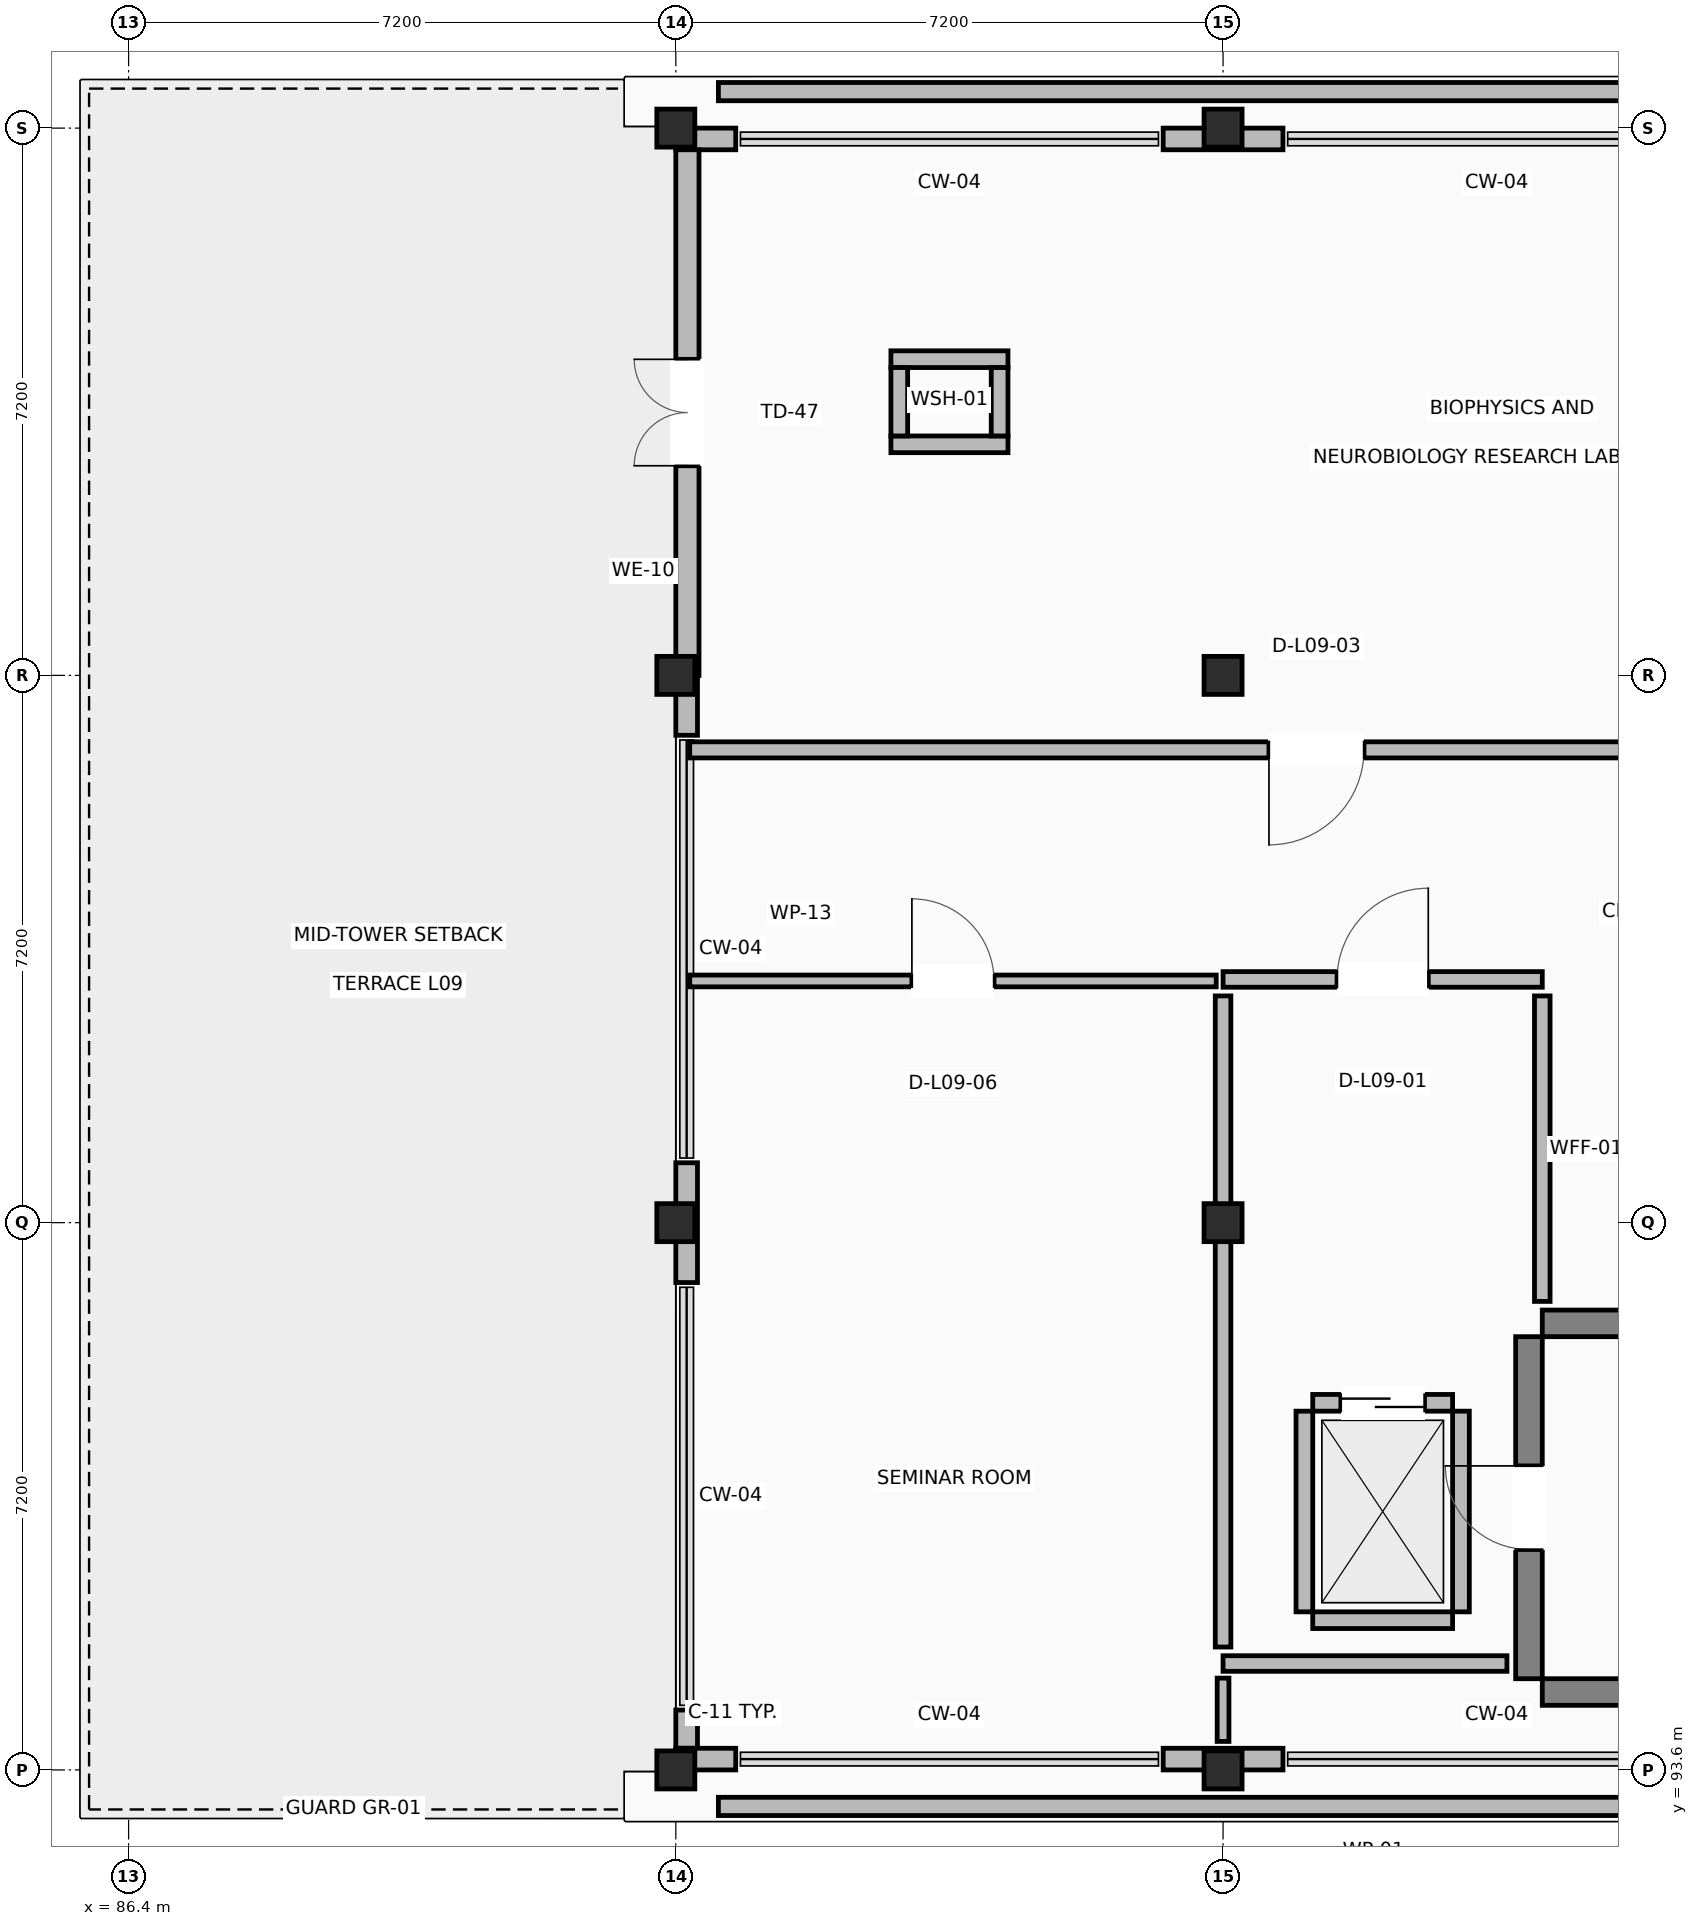
"""IFC4 building model, lengths in metres.
Left out: names, types, materials, properties, quantities, classifications, styles, units other than length and angle.
Written with IfcOpenShell. Run it as: python <this file> out.ifc"""

import sys

from ifc_helpers import new_model, si_unit, direction, frame, frame_2d, origin, origin_2d, place, context, subcontext, project, spatial, rectangle, extrude, element, fill, save


model = new_model("IFC4")
c1 = context("Model", 3, precision=1e-05, world=origin(), true_north=direction((0.0, 1.0)))
c2 = subcontext(c1, "Body", "Model", "MODEL_VIEW")
j1 = project(units=[si_unit("LENGTHUNIT", "METRE"), si_unit("PLANEANGLEUNIT", "RADIAN")], contexts=[c1])
p1 = place(None, origin())
s1 = spatial("IfcSite", under=j1, at=p1, CompositionType="ELEMENT")
p2 = place(p1, origin())
s2 = spatial("IfcBuilding", under=s1, at=p2, CompositionType="ELEMENT")
p3 = place(p2, frame((0.0, 0.0, 39.6)))
s3 = spatial("IfcBuildingStorey", under=s2, at=p3, CompositionType="ELEMENT", Elevation=39.6)
for number, where, z_axis, x_axis in (
    (1, (93.6, 93.6, 0.0), (0.0, 0.0, 1.0), (1.0, 0.0, 0.0)),
    (2, (93.6, 100.8, 0.0), (0.0, 0.0, 1.0), (1.0, 0.0, 0.0)),
    (3, (93.6, 108.0, 0.0), (0.0, 0.0, 1.0), (1.0, 0.0, 0.0)),
    (4, (93.6, 115.2, 0.0), (0.0, 0.0, 1.0), (1.0, 0.0, 0.0)),
    (5, (100.8, 93.6, 0.0), (0.0, 0.0, 1.0), (1.0, 0.0, 0.0)),
    (6, (100.8, 100.8, 0.0), (0.0, 0.0, 1.0), (1.0, 0.0, 0.0)),
    (7, (100.8, 108.0, 0.0), (0.0, 0.0, 1.0), (1.0, 0.0, 0.0)),
    (8, (100.8, 115.2, 0.0), (0.0, 0.0, 1.0), (1.0, 0.0, 0.0)),
):
    element("IfcColumn", number, at=place(p3, frame(where, z_axis=z_axis, x_axis=x_axis)), inside=s3, PredefinedType="COLUMN", context=c2, shape_type="SweptSolid", body=[
        extrude(rectangle(XDim=0.5, YDim=0.5, at=origin_2d()), origin(), (0.0, 0.0, 1.0), 3.92),
    ])
for number, where, z_axis, x_axis in (
    (9, (105.0, 94.625, 0.0), (0.0, 0.0, 1.0), (1.0, 0.0, 0.0)),
    (10, (105.0, 99.475, 0.0), (0.0, 0.0, 1.0), (1.0, 0.0, 0.0)),
):
    element("IfcWall", number, at=place(p3, frame(where, z_axis=z_axis, x_axis=x_axis)), inside=s3, PredefinedType="SHEAR", context=c2, shape_type="SweptSolid", body=[
        extrude(rectangle(XDim=9.5, YDim=0.35, at=frame_2d((4.75, 0.0))), origin(), (0.0, 0.0, 1.0), 3.92),
    ])
p4 = place(p3, frame((104.825, 94.8, 0.0), z_axis=(0.0, 0.0, 1.0), x_axis=(0.0, 1.0, 0.0)))
e11 = element("IfcWall", 11, at=p4, inside=s3, PredefinedType="SHEAR", context=c2, shape_type="SweptSolid", body=[
    extrude(rectangle(XDim=4.5, YDim=0.35, at=frame_2d((2.25, 0.0))), origin(), (0.0, 0.0, 1.0), 3.92),
])
p5 = place(p4, frame((1.7, 0.0, 0.0)))
e12 = element("IfcOpeningElement", 12, at=p5, cuts=e11, PredefinedType="OPENING", context=c2, shape_type="SweptSolid", body=[
    extrude(rectangle(XDim=1.1, YDim=2.15, at=frame_2d((0.55, 1.075))), frame((0.0, 0.185, 0.0), z_axis=(0.0, -1.0, 0.0), x_axis=(1.0, 0.0, 0.0)), (0.0, 0.0, 1.0), 0.37),
])
p6 = place(p3, frame((101.588, 115.058, 0.0), z_axis=(0.0, 0.0, 1.0), x_axis=(-1.0, 0.0, 0.0)))
e13 = element("IfcWall", 13, at=p6, inside=s3, PredefinedType="STANDARD", context=c2, shape_type="SweptSolid", body=[
    extrude(rectangle(XDim=1.576, YDim=0.285, at=frame_2d((0.788, 0.0))), origin(), (0.0, 0.0, 1.0), 2.96),
])
p7 = place(p3, frame((94.388, 115.058, 0.0), z_axis=(0.0, 0.0, 1.0), x_axis=(-1.0, 0.0, 0.0)))
e14 = element("IfcWall", 14, at=p7, inside=s3, PredefinedType="STANDARD", context=c2, shape_type="SweptSolid", body=[
    extrude(rectangle(XDim=0.788, YDim=0.285, at=frame_2d((0.394, 0.0))), origin(), (0.0, 0.0, 1.0), 2.96),
])
p8 = place(p3, frame((93.752, 108.0, 0.0), z_axis=(0.0, 0.0, 1.0), x_axis=(0.0, 1.0, 0.0)))
e15 = element("IfcWall", 15, at=p8, inside=s3, PredefinedType="STANDARD", context=c2, shape_type="SweptSolid", body=[
    extrude(rectangle(XDim=6.915, YDim=0.305, at=frame_2d((3.458, 0.0))), origin(), (0.0, 0.0, 1.0), 2.96),
])
p9 = place(p8, frame((2.758, 0.0, 0.0)))
e16 = element("IfcOpeningElement", 16, at=p9, cuts=e15, PredefinedType="OPENING", context=c2, shape_type="SweptSolid", body=[
    extrude(rectangle(XDim=1.4, YDim=2.15, at=frame_2d((0.7, 1.075))), frame((0.0, 0.162, 0.0), z_axis=(0.0, -1.0, 0.0), x_axis=(1.0, 0.0, 0.0)), (0.0, 0.0, 1.0), 0.325),
])
p10 = place(p3, frame((93.742, 108.0, 0.0), z_axis=(0.0, 0.0, 1.0), x_axis=(0.0, -1.0, 0.0)))
e17 = element("IfcWall", 17, at=p10, inside=s3, PredefinedType="STANDARD", context=c2, shape_type="SweptSolid", body=[
    extrude(rectangle(XDim=0.788, YDim=0.285, at=frame_2d((0.394, 0.0))), origin(), (0.0, 0.0, 1.0), 2.96),
])
p11 = place(p3, frame((93.742, 101.588, 0.0), z_axis=(0.0, 0.0, 1.0), x_axis=(0.0, -1.0, 0.0)))
e18 = element("IfcWall", 18, at=p11, inside=s3, PredefinedType="STANDARD", context=c2, shape_type="SweptSolid", body=[
    extrude(rectangle(XDim=1.576, YDim=0.285, at=frame_2d((0.788, 0.0))), origin(), (0.0, 0.0, 1.0), 2.96),
])
p12 = place(p3, frame((93.742, 94.388, 0.0), z_axis=(0.0, 0.0, 1.0), x_axis=(0.0, -1.0, 0.0)))
e19 = element("IfcWall", 19, at=p12, inside=s3, PredefinedType="STANDARD", context=c2, shape_type="SweptSolid", body=[
    extrude(rectangle(XDim=0.503, YDim=0.285, at=frame_2d((0.251, 0.0))), origin(), (0.0, 0.0, 1.0), 2.96),
])
p13 = place(p3, frame((93.6, 93.742, 0.0), z_axis=(0.0, 0.0, 1.0), x_axis=(1.0, 0.0, 0.0)))
e20 = element("IfcWall", 20, at=p13, inside=s3, PredefinedType="STANDARD", context=c2, shape_type="SweptSolid", body=[
    extrude(rectangle(XDim=0.788, YDim=0.285, at=frame_2d((0.394, 0.0))), origin(), (0.0, 0.0, 1.0), 2.96),
])
p14 = place(p3, frame((100.012, 93.742, 0.0), z_axis=(0.0, 0.0, 1.0), x_axis=(1.0, 0.0, 0.0)))
e21 = element("IfcWall", 21, at=p14, inside=s3, PredefinedType="STANDARD", context=c2, shape_type="SweptSolid", body=[
    extrude(rectangle(XDim=1.576, YDim=0.285, at=frame_2d((0.788, 0.0))), origin(), (0.0, 0.0, 1.0), 2.96),
])
p15 = place(p3, frame((136.44, 93.12, 0.0), z_axis=(0.0, 0.0, 1.0), x_axis=(-1.0, 0.0, 0.0)))
e22 = element("IfcWall", 22, at=p15, inside=s3, PredefinedType="PARAPET", context=c2, shape_type="SweptSolid", body=[
    extrude(rectangle(XDim=42.28, YDim=0.24, at=frame_2d((21.14, 0.0))), origin(), (0.0, 0.0, 1.0), 1.12),
])
p16 = place(p3, frame((94.16, 115.68, 0.0), z_axis=(0.0, 0.0, 1.0), x_axis=(1.0, 0.0, 0.0)))
e23 = element("IfcWall", 23, at=p16, inside=s3, PredefinedType="PARAPET", context=c2, shape_type="SweptSolid", body=[
    extrude(rectangle(XDim=57.64, YDim=0.24, at=frame_2d((28.82, 0.0))), origin(), (0.0, 0.0, 1.0), 1.12),
])
p17 = place(p3, frame((101.98, 95.57, 0.0), z_axis=(0.0, 0.0, 1.0), x_axis=(1.0, 0.0, 0.0)))
e24 = element("IfcWall", 24, at=p17, inside=s3, PredefinedType="STANDARD", context=c2, shape_type="SweptSolid", body=[
    extrude(rectangle(XDim=1.84, YDim=0.22, at=frame_2d((0.92, 0.0))), origin(), (0.0, 0.0, 1.0), 2.96),
])
p18 = place(p3, frame((101.98, 98.43, 0.0), z_axis=(0.0, 0.0, 1.0), x_axis=(1.0, 0.0, 0.0)))
e25 = element("IfcWall", 25, at=p18, inside=s3, PredefinedType="STANDARD", context=c2, shape_type="SweptSolid", body=[
    extrude(rectangle(XDim=1.84, YDim=0.22, at=frame_2d((0.92, 0.0))), origin(), (0.0, 0.0, 1.0), 2.96),
])
p19 = place(p18, frame((0.37, 0.0, 0.0)))
e26 = element("IfcOpeningElement", 26, at=p19, cuts=e25, PredefinedType="OPENING", context=c2, shape_type="SweptSolid", body=[
    extrude(rectangle(XDim=1.1, YDim=2.15, at=frame_2d((0.55, 1.075))), frame((0.0, 0.12, 0.0), z_axis=(0.0, -1.0, 0.0), x_axis=(1.0, 0.0, 0.0)), (0.0, 0.0, 1.0), 0.24),
])
for number, where, z_axis, x_axis in (
    (27, (101.87, 95.68, 0.0), (0.0, 0.0, 1.0), (0.0, 1.0, 0.0)),
    (28, (103.93, 95.68, 0.0), (0.0, 0.0, 1.0), (0.0, 1.0, 0.0)),
):
    element("IfcWall", number, at=place(p3, frame(where, z_axis=z_axis, x_axis=x_axis)), inside=s3, PredefinedType="STANDARD", context=c2, shape_type="SweptSolid", body=[
        extrude(rectangle(XDim=2.64, YDim=0.22, at=frame_2d((1.32, 0.0))), origin(), (0.0, 0.0, 1.0), 2.96),
    ])
for number, where, z_axis, x_axis in (
    (29, (96.43, 111.04, 0.0), (0.0, 0.0, 1.0), (1.0, 0.0, 0.0)),
    (30, (96.43, 112.16, 0.0), (0.0, 0.0, 1.0), (1.0, 0.0, 0.0)),
):
    element("IfcWall", number, at=place(p3, frame(where, z_axis=z_axis, x_axis=x_axis)), inside=s3, PredefinedType="STANDARD", context=c2, shape_type="SweptSolid", body=[
        extrude(rectangle(XDim=1.54, YDim=0.22, at=frame_2d((0.77, 0.0))), origin(), (0.0, 0.0, 1.0), 2.96),
    ])
for number, where, z_axis, x_axis in (
    (31, (96.54, 111.15, 0.0), (0.0, 0.0, 1.0), (0.0, 1.0, 0.0)),
    (32, (97.86, 111.15, 0.0), (0.0, 0.0, 1.0), (0.0, 1.0, 0.0)),
):
    element("IfcWall", number, at=place(p3, frame(where, z_axis=z_axis, x_axis=x_axis)), inside=s3, PredefinedType="STANDARD", context=c2, shape_type="SweptSolid", body=[
        extrude(rectangle(XDim=0.9, YDim=0.22, at=frame_2d((0.45, 0.0))), origin(), (0.0, 0.0, 1.0), 2.96),
    ])
p20 = place(p3, frame((100.8, 104.0, 0.0), z_axis=(0.0, 0.0, 1.0), x_axis=(1.0, 0.0, 0.0)))
e33 = element("IfcWall", 33, at=p20, inside=s3, PredefinedType="PARTITIONING", context=c2, shape_type="SweptSolid", body=[
    extrude(rectangle(XDim=4.2, YDim=0.205, at=frame_2d((2.1, 0.0))), origin(), (0.0, 0.0, 1.0), 2.96),
])
p21 = place(p20, frame((1.5, 0.0, 0.0)))
e34 = element("IfcOpeningElement", 34, at=p21, cuts=e33, PredefinedType="OPENING", context=c2, shape_type="SweptSolid", body=[
    extrude(rectangle(XDim=1.2, YDim=2.15, at=frame_2d((0.6, 1.075))), frame((0.0, 0.113, 0.0), z_axis=(0.0, -1.0, 0.0), x_axis=(1.0, 0.0, 0.0)), (0.0, 0.0, 1.0), 0.225),
])
p22 = place(p3, frame((105.0, 103.783, 0.0), z_axis=(0.0, 0.0, 1.0), x_axis=(0.0, -1.0, 0.0)))
e35 = element("IfcWall", 35, at=p22, inside=s3, PredefinedType="PARTITIONING", context=c2, shape_type="SweptSolid", body=[
    extrude(rectangle(XDim=4.019, YDim=0.205, at=frame_2d((2.01, 0.0))), origin(), (0.0, 0.0, 1.0), 2.96),
])
p23 = place(p3, frame((104.535, 95.0, 0.0), z_axis=(0.0, 0.0, 1.0), x_axis=(-1.0, 0.0, 0.0)))
e36 = element("IfcWall", 36, at=p23, inside=s3, PredefinedType="PARTITIONING", context=c2, shape_type="SweptSolid", body=[
    extrude(rectangle(XDim=3.735, YDim=0.205, at=frame_2d((1.867, 0.0))), origin(), (0.0, 0.0, 1.0), 2.96),
])
p24 = place(p3, frame((100.8, 95.217, 0.0), z_axis=(0.0, 0.0, 1.0), x_axis=(0.0, 1.0, 0.0)))
e37 = element("IfcWall", 37, at=p24, inside=s3, PredefinedType="PARTITIONING", context=c2, shape_type="SweptSolid", body=[
    extrude(rectangle(XDim=8.566, YDim=0.205, at=frame_2d((4.283, 0.0))), origin(), (0.0, 0.0, 1.0), 2.96),
])
p25 = place(p3, frame((109.376, 107.02, 0.0), z_axis=(0.0, 0.0, 1.0), x_axis=(-1.0, 0.0, 0.0)))
e38 = element("IfcWall", 38, at=p25, inside=s3, PredefinedType="PARTITIONING", context=c2, shape_type="SweptSolid", body=[
    extrude(rectangle(XDim=15.593, YDim=0.212, at=frame_2d((7.796, 0.0))), origin(), (0.0, 0.0, 1.0), 2.96),
])
p26 = place(p25, frame((6.722, 0.0, 0.0)))
e39 = element("IfcOpeningElement", 39, at=p26, cuts=e38, PredefinedType="OPENING", context=c2, shape_type="SweptSolid", body=[
    extrude(rectangle(XDim=1.25, YDim=2.15, at=frame_2d((0.625, 1.075))), frame((0.0, 0.116, 0.0), z_axis=(0.0, -1.0, 0.0), x_axis=(1.0, 0.0, 0.0)), (0.0, 0.0, 1.0), 0.232),
])
p27 = place(p3, frame((93.783, 103.98, 0.0), z_axis=(0.0, 0.0, 1.0), x_axis=(1.0, 0.0, 0.0)))
e40 = element("IfcWall", 40, at=p27, inside=s3, PredefinedType="PARTITIONING", context=c2, shape_type="SweptSolid", body=[
    extrude(rectangle(XDim=6.927, YDim=0.155, at=frame_2d((3.463, 0.0))), origin(), (0.0, 0.0, 1.0), 2.96),
])
p28 = place(p27, frame((2.923, 0.0, 0.0)))
e41 = element("IfcOpeningElement", 41, at=p28, cuts=e40, PredefinedType="OPENING", context=c2, shape_type="SweptSolid", body=[
    extrude(rectangle(XDim=1.08, YDim=2.15, at=frame_2d((0.54, 1.075))), frame((0.0, 0.087, 0.0), z_axis=(0.0, -1.0, 0.0), x_axis=(1.0, 0.0, 0.0)), (0.0, 0.0, 1.0), 0.175),
])
p29 = place(p3, frame((100.8, 94.808, 0.0), z_axis=(0.0, 0.0, 1.0), x_axis=(0.0, -1.0, 0.0)))
e42 = element("IfcWall", 42, at=p29, inside=s3, PredefinedType="PARTITIONING", context=c2, shape_type="SweptSolid", body=[
    extrude(rectangle(XDim=0.833, YDim=0.155, at=frame_2d((0.417, 0.0))), origin(), (0.0, 0.0, 1.0), 2.96),
])
p30 = place(p9, origin())
e43 = element("IfcDoor", 43, at=p30, inside=s3, OperationType="DOUBLE_DOOR_SINGLE_SWING", PredefinedType="DOOR", context=c2, shape_type="SweptSolid", body=[
    extrude(rectangle(XDim=1.4, YDim=2.15, at=frame_2d((0.7, 1.075))), frame((0.0, 0.025, 0.0), z_axis=(0.0, -1.0, 0.0), x_axis=(1.0, 0.0, 0.0)), (0.0, 0.0, 1.0), 0.05),
])
fill(e16, e43)
p31 = place(p5, origin())
e44 = element("IfcDoor", 44, at=p31, inside=s3, OperationType="SINGLE_SWING_RIGHT", PredefinedType="DOOR", context=c2, shape_type="SweptSolid", body=[
    extrude(rectangle(XDim=1.1, YDim=2.15, at=frame_2d((0.55, 1.075))), frame((0.0, 0.025, 0.0), z_axis=(0.0, -1.0, 0.0), x_axis=(1.0, 0.0, 0.0)), (0.0, 0.0, 1.0), 0.05),
])
fill(e12, e44)
p32 = place(p19, origin())
e45 = element("IfcDoor", 45, at=p32, inside=s3, OperationType="SLIDING_TO_RIGHT", PredefinedType="DOOR", context=c2, shape_type="SweptSolid", body=[
    extrude(rectangle(XDim=1.1, YDim=2.15, at=frame_2d((0.55, 1.075))), frame((0.0, 0.025, 0.0), z_axis=(0.0, -1.0, 0.0), x_axis=(1.0, 0.0, 0.0)), (0.0, 0.0, 1.0), 0.05),
])
fill(e26, e45)
p33 = place(p21, origin())
e46 = element("IfcDoor", 46, at=p33, inside=s3, OperationType="SINGLE_SWING_RIGHT", PredefinedType="DOOR", context=c2, shape_type="SweptSolid", body=[
    extrude(rectangle(XDim=1.2, YDim=2.15, at=frame_2d((0.6, 1.075))), frame((0.0, 0.025, 0.0), z_axis=(0.0, -1.0, 0.0), x_axis=(1.0, 0.0, 0.0)), (0.0, 0.0, 1.0), 0.05),
])
fill(e34, e46)
p34 = place(p26, origin())
e47 = element("IfcDoor", 47, at=p34, inside=s3, OperationType="SINGLE_SWING_RIGHT", PredefinedType="DOOR", context=c2, shape_type="SweptSolid", body=[
    extrude(rectangle(XDim=1.25, YDim=2.15, at=frame_2d((0.625, 1.075))), frame((0.0, 0.025, 0.0), z_axis=(0.0, -1.0, 0.0), x_axis=(1.0, 0.0, 0.0)), (0.0, 0.0, 1.0), 0.05),
])
fill(e39, e47)
p35 = place(p28, origin())
e48 = element("IfcDoor", 48, at=p35, inside=s3, OperationType="SINGLE_SWING_LEFT", PredefinedType="DOOR", context=c2, shape_type="SweptSolid", body=[
    extrude(rectangle(XDim=1.08, YDim=2.15, at=frame_2d((0.54, 1.075))), frame((0.0, 0.025, 0.0), z_axis=(0.0, -1.0, 0.0), x_axis=(1.0, 0.0, 0.0)), (0.0, 0.0, 1.0), 0.05),
])
fill(e41, e48)
save(model, sys.argv[1])
